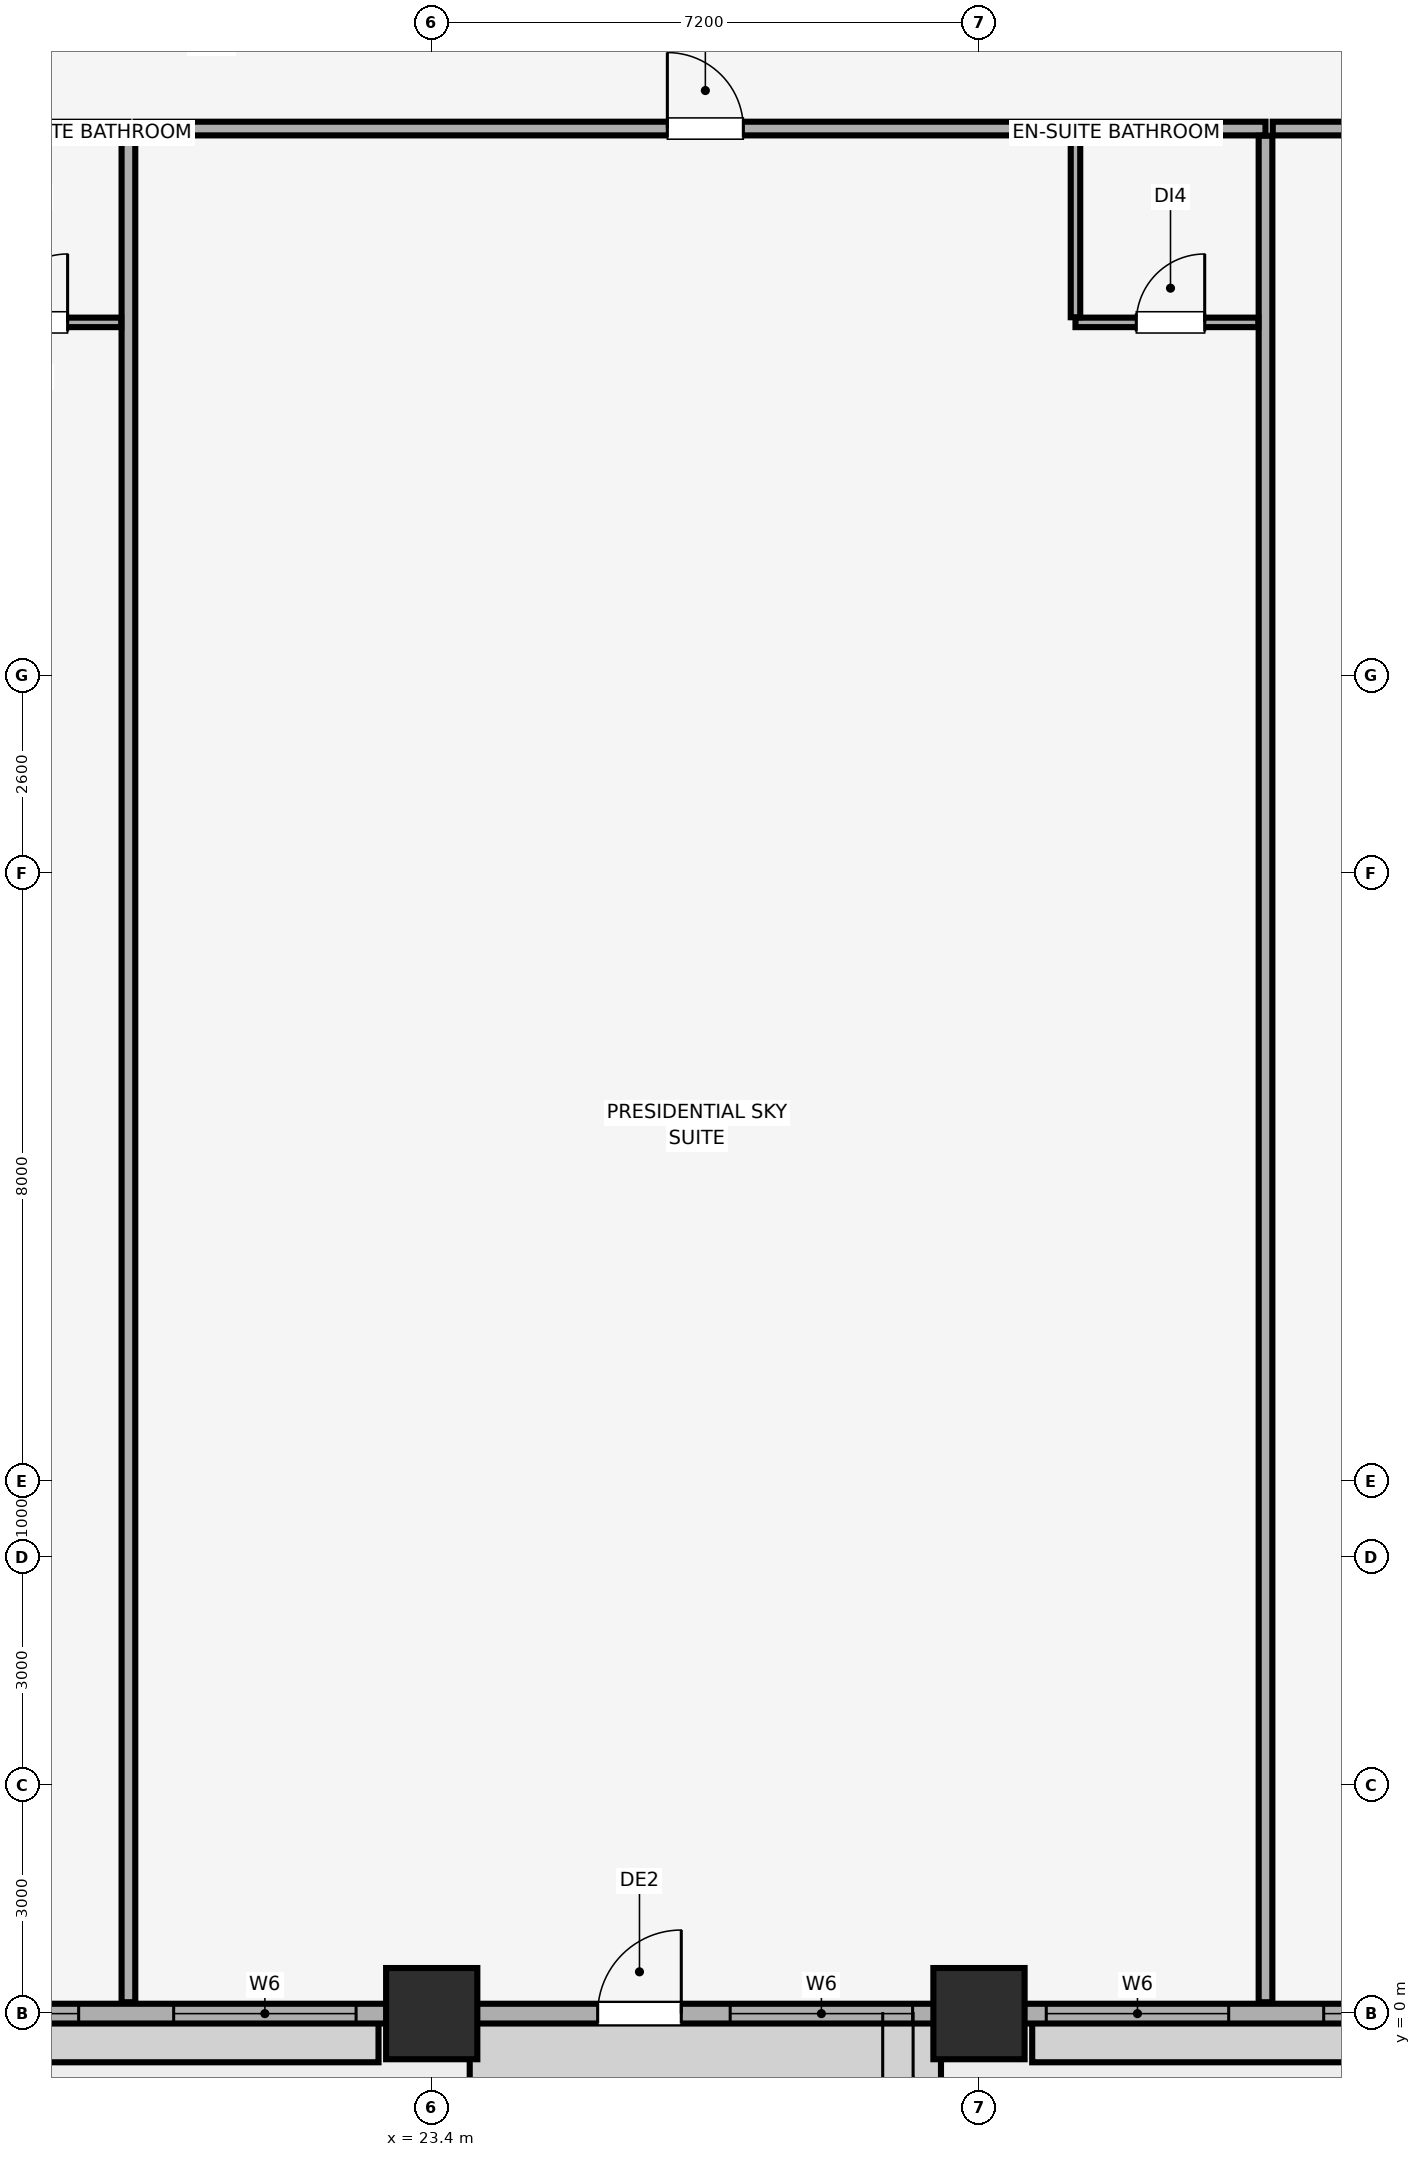
"""IFC4 building model, lengths in metres.
Left out: names, types, materials, properties, quantities, classifications, styles, units other than length and angle.
Written with IfcOpenShell. Run it as: python <this file> out.ifc"""

import sys

from ifc_helpers import new_model, si_unit, direction, frame, frame_2d, origin, origin_2d, place, context, subcontext, project, spatial, rectangle, extrude, element, fill, save


model = new_model("IFC4")
c1 = context("Model", 3, precision=1e-05, world=origin(), true_north=direction((0.0, 1.0)))
c2 = subcontext(c1, "Body", "Model", "MODEL_VIEW")
j1 = project(units=[si_unit("LENGTHUNIT", "METRE"), si_unit("PLANEANGLEUNIT", "RADIAN")], contexts=[c1])
p1 = place(None, origin())
s1 = spatial("IfcSite", under=j1, at=p1, CompositionType="ELEMENT")
p2 = place(p1, origin())
s2 = spatial("IfcBuilding", under=s1, at=p2, CompositionType="ELEMENT")
p3 = place(p2, frame((0.0, 0.0, 126.8)))
s3 = spatial("IfcBuildingStorey", under=s2, at=p3, CompositionType="ELEMENT", Elevation=126.8)
for number, where, z_axis, x_axis in (
    (1, (23.4, 0.0, 0.0), (0.0, 0.0, 1.0), (1.0, 0.0, 0.0)),
    (2, (30.6, 0.0, 0.0), (0.0, 0.0, 1.0), (1.0, 0.0, 0.0)),
):
    element("IfcColumn", number, at=place(p3, frame(where, z_axis=z_axis, x_axis=x_axis)), inside=s3, PredefinedType="COLUMN", context=c2, shape_type="SweptSolid", body=[
        extrude(rectangle(XDim=1.2, YDim=1.2, at=origin_2d()), origin(), (0.0, 0.0, 1.0), 3.51),
    ])
p4 = place(p3, frame((4.2, 0.0, 0.0), z_axis=(0.0, 0.0, 1.0), x_axis=(1.0, 0.0, 0.0)))
e3 = element("IfcWall", 3, at=p4, inside=s3, PredefinedType="SOLIDWALL", context=c2, shape_type="SweptSolid", body=[
    extrude(rectangle(XDim=75.6, YDim=0.26, at=frame_2d((37.8, 0.0))), origin(), (0.0, 0.0, 1.0), 2.56),
])
p5 = place(p4, frame((21.383, 0.0, 0.0)))
e4 = element("IfcOpeningElement", 4, at=p5, cuts=e3, PredefinedType="OPENING", context=c2, shape_type="SweptSolid", body=[
    extrude(rectangle(XDim=1.1, YDim=2.15, at=frame_2d((0.55, 1.075))), frame((0.0, 0.14, 0.0), z_axis=(0.0, -1.0, 0.0), x_axis=(1.0, 0.0, 0.0)), (0.0, 0.0, 1.0), 0.28),
])
p6 = place(p4, frame((36.432, 0.0, 0.0)))
e5 = element("IfcOpeningElement", 5, at=p6, cuts=e3, PredefinedType="OPENING", context=c2, shape_type="SweptSolid", body=[
    extrude(rectangle(XDim=1.1, YDim=2.15, at=frame_2d((0.55, 1.075))), frame((0.0, 0.14, 0.0), z_axis=(0.0, -1.0, 0.0), x_axis=(1.0, 0.0, 0.0)), (0.0, 0.0, 1.0), 0.28),
])
p7 = place(p4, frame((58.094, 0.0, 0.0)))
e6 = element("IfcOpeningElement", 6, at=p7, cuts=e3, PredefinedType="OPENING", context=c2, shape_type="SweptSolid", body=[
    extrude(rectangle(XDim=1.1, YDim=2.15, at=frame_2d((0.55, 1.075))), frame((0.0, 0.14, 0.0), z_axis=(0.0, -1.0, 0.0), x_axis=(1.0, 0.0, 0.0)), (0.0, 0.0, 1.0), 0.28),
])
p8 = place(p4, frame((1.035, 0.0, 0.85)))
e7 = element("IfcOpeningElement", 7, at=p8, cuts=e3, PredefinedType="OPENING", context=c2, shape_type="SweptSolid", body=[
    extrude(rectangle(XDim=2.4, YDim=1.5, at=frame_2d((1.2, 0.75))), frame((0.0, 0.14, 0.0), z_axis=(0.0, -1.0, 0.0), x_axis=(1.0, 0.0, 0.0)), (0.0, 0.0, 1.0), 0.28),
])
p9 = place(p4, frame((7.2, 0.0, 0.85)))
e8 = element("IfcOpeningElement", 8, at=p9, cuts=e3, PredefinedType="OPENING", context=c2, shape_type="SweptSolid", body=[
    extrude(rectangle(XDim=2.4, YDim=1.5, at=frame_2d((1.2, 0.75))), frame((0.0, 0.14, 0.0), z_axis=(0.0, -1.0, 0.0), x_axis=(1.0, 0.0, 0.0)), (0.0, 0.0, 1.0), 0.28),
])
p10 = place(p4, frame((13.055, 0.0, 0.85)))
e9 = element("IfcOpeningElement", 9, at=p10, cuts=e3, PredefinedType="OPENING", context=c2, shape_type="SweptSolid", body=[
    extrude(rectangle(XDim=1.5, YDim=1.4, at=frame_2d((0.75, 0.7))), frame((0.0, 0.14, 0.0), z_axis=(0.0, -1.0, 0.0), x_axis=(1.0, 0.0, 0.0)), (0.0, 0.0, 1.0), 0.28),
])
p11 = place(p4, frame((15.805, 0.0, 0.85)))
e10 = element("IfcOpeningElement", 10, at=p11, cuts=e3, PredefinedType="OPENING", context=c2, shape_type="SweptSolid", body=[
    extrude(rectangle(XDim=2.4, YDim=1.5, at=frame_2d((1.2, 0.75))), frame((0.0, 0.14, 0.0), z_axis=(0.0, -1.0, 0.0), x_axis=(1.0, 0.0, 0.0)), (0.0, 0.0, 1.0), 0.28),
])
p12 = place(p4, frame((23.127, 0.0, 0.85)))
e11 = element("IfcOpeningElement", 11, at=p12, cuts=e3, PredefinedType="OPENING", context=c2, shape_type="SweptSolid", body=[
    extrude(rectangle(XDim=2.4, YDim=1.5, at=frame_2d((1.2, 0.75))), frame((0.0, 0.14, 0.0), z_axis=(0.0, -1.0, 0.0), x_axis=(1.0, 0.0, 0.0)), (0.0, 0.0, 1.0), 0.28),
])
p13 = place(p4, frame((27.285, 0.0, 0.85)))
e12 = element("IfcOpeningElement", 12, at=p13, cuts=e3, PredefinedType="OPENING", context=c2, shape_type="SweptSolid", body=[
    extrude(rectangle(XDim=2.4, YDim=1.5, at=frame_2d((1.2, 0.75))), frame((0.0, 0.14, 0.0), z_axis=(0.0, -1.0, 0.0), x_axis=(1.0, 0.0, 0.0)), (0.0, 0.0, 1.0), 0.28),
])
p14 = place(p4, frame((30.935, 0.0, 0.85)))
e13 = element("IfcOpeningElement", 13, at=p14, cuts=e3, PredefinedType="OPENING", context=c2, shape_type="SweptSolid", body=[
    extrude(rectangle(XDim=1.5, YDim=1.4, at=frame_2d((0.75, 0.7))), frame((0.0, 0.14, 0.0), z_axis=(0.0, -1.0, 0.0), x_axis=(1.0, 0.0, 0.0)), (0.0, 0.0, 1.0), 0.28),
])
p15 = place(p4, frame((38.451, 0.0, 0.85)))
e14 = element("IfcOpeningElement", 14, at=p15, cuts=e3, PredefinedType="OPENING", context=c2, shape_type="SweptSolid", body=[
    extrude(rectangle(XDim=2.4, YDim=1.5, at=frame_2d((1.2, 0.75))), frame((0.0, 0.14, 0.0), z_axis=(0.0, -1.0, 0.0), x_axis=(1.0, 0.0, 0.0)), (0.0, 0.0, 1.0), 0.28),
])
p16 = place(p4, frame((43.115, 0.0, 0.85)))
e15 = element("IfcOpeningElement", 15, at=p16, cuts=e3, PredefinedType="OPENING", context=c2, shape_type="SweptSolid", body=[
    extrude(rectangle(XDim=1.5, YDim=1.4, at=frame_2d((0.75, 0.7))), frame((0.0, 0.14, 0.0), z_axis=(0.0, -1.0, 0.0), x_axis=(1.0, 0.0, 0.0)), (0.0, 0.0, 1.0), 0.28),
])
p17 = place(p4, frame((45.865, 0.0, 0.85)))
e16 = element("IfcOpeningElement", 16, at=p17, cuts=e3, PredefinedType="OPENING", context=c2, shape_type="SweptSolid", body=[
    extrude(rectangle(XDim=2.4, YDim=1.5, at=frame_2d((1.2, 0.75))), frame((0.0, 0.14, 0.0), z_axis=(0.0, -1.0, 0.0), x_axis=(1.0, 0.0, 0.0)), (0.0, 0.0, 1.0), 0.28),
])
p18 = place(p4, frame((51.6, 0.0, 0.85)))
e17 = element("IfcOpeningElement", 17, at=p18, cuts=e3, PredefinedType="OPENING", context=c2, shape_type="SweptSolid", body=[
    extrude(rectangle(XDim=2.4, YDim=1.5, at=frame_2d((1.2, 0.75))), frame((0.0, 0.14, 0.0), z_axis=(0.0, -1.0, 0.0), x_axis=(1.0, 0.0, 0.0)), (0.0, 0.0, 1.0), 0.28),
])
p19 = place(p4, frame((61.095, 0.0, 0.85)))
e18 = element("IfcOpeningElement", 18, at=p19, cuts=e3, PredefinedType="OPENING", context=c2, shape_type="SweptSolid", body=[
    extrude(rectangle(XDim=1.5, YDim=1.4, at=frame_2d((0.75, 0.7))), frame((0.0, 0.14, 0.0), z_axis=(0.0, -1.0, 0.0), x_axis=(1.0, 0.0, 0.0)), (0.0, 0.0, 1.0), 0.28),
])
p20 = place(p4, frame((66.0, 0.0, 0.85)))
e19 = element("IfcOpeningElement", 19, at=p20, cuts=e3, PredefinedType="OPENING", context=c2, shape_type="SweptSolid", body=[
    extrude(rectangle(XDim=2.4, YDim=1.5, at=frame_2d((1.2, 0.75))), frame((0.0, 0.14, 0.0), z_axis=(0.0, -1.0, 0.0), x_axis=(1.0, 0.0, 0.0)), (0.0, 0.0, 1.0), 0.28),
])
p21 = place(p4, frame((72.165, 0.0, 0.85)))
e20 = element("IfcOpeningElement", 20, at=p21, cuts=e3, PredefinedType="OPENING", context=c2, shape_type="SweptSolid", body=[
    extrude(rectangle(XDim=2.4, YDim=1.5, at=frame_2d((1.2, 0.75))), frame((0.0, 0.14, 0.0), z_axis=(0.0, -1.0, 0.0), x_axis=(1.0, 0.0, 0.0)), (0.0, 0.0, 1.0), 0.28),
])
p22 = place(p3, frame((0.15, 24.8, 0.0), z_axis=(0.0, 0.0, 1.0), x_axis=(1.0, 0.0, 0.0)))
e21 = element("IfcWall", 21, at=p22, inside=s3, PredefinedType="PARTITIONING", context=c2, shape_type="SweptSolid", body=[
    extrude(rectangle(XDim=19.26, YDim=0.18, at=frame_2d((9.63, 0.0))), origin(), (0.0, 0.0, 1.0), 3.51),
])
p23 = place(p22, frame((11.95, 0.0, 0.0)))
e22 = element("IfcOpeningElement", 22, at=p23, cuts=e21, PredefinedType="OPENING", context=c2, shape_type="SweptSolid", body=[
    extrude(rectangle(XDim=1.0, YDim=2.15, at=frame_2d((0.5, 1.075))), frame((0.0, 0.1, 0.0), z_axis=(0.0, -1.0, 0.0), x_axis=(1.0, 0.0, 0.0)), (0.0, 0.0, 1.0), 0.2),
])
p24 = place(p3, frame((19.41, 0.15, 0.0), z_axis=(0.0, 0.0, 1.0), x_axis=(0.0, 1.0, 0.0)))
e23 = element("IfcWall", 23, at=p24, inside=s3, PredefinedType="PARTITIONING", context=c2, shape_type="SweptSolid", body=[
    extrude(rectangle(XDim=24.555, YDim=0.18, at=frame_2d((12.278, 0.0))), origin(), (0.0, 0.0, 1.0), 3.51),
])
p25 = place(p3, frame((16.91, 22.25, 0.0), z_axis=(0.0, 0.0, 1.0), x_axis=(1.0, 0.0, 0.0)))
e24 = element("IfcWall", 24, at=p25, inside=s3, PredefinedType="PARTITIONING", context=c2, shape_type="SweptSolid", body=[
    extrude(rectangle(XDim=2.405, YDim=0.125, at=frame_2d((1.202, 0.0))), origin(), (0.0, 0.0, 1.0), 3.51),
])
p26 = place(p25, frame((0.8, 0.0, 0.0)))
e25 = element("IfcOpeningElement", 25, at=p26, cuts=e24, PredefinedType="OPENING", context=c2, shape_type="SweptSolid", body=[
    extrude(rectangle(XDim=0.9, YDim=2.1, at=frame_2d((0.45, 1.05))), frame((0.0, 0.073, 0.0), z_axis=(0.0, -1.0, 0.0), x_axis=(1.0, 0.0, 0.0)), (0.0, 0.0, 1.0), 0.145),
])
p27 = place(p3, frame((19.505, 24.8, 0.0), z_axis=(0.0, 0.0, 1.0), x_axis=(1.0, 0.0, 0.0)))
e26 = element("IfcWall", 26, at=p27, inside=s3, PredefinedType="PARTITIONING", context=c2, shape_type="SweptSolid", body=[
    extrude(rectangle(XDim=14.865, YDim=0.18, at=frame_2d((7.432, 0.0))), origin(), (0.0, 0.0, 1.0), 3.51),
])
p28 = place(p27, frame((6.995, 0.0, 0.0)))
e27 = element("IfcOpeningElement", 27, at=p28, cuts=e26, PredefinedType="OPENING", context=c2, shape_type="SweptSolid", body=[
    extrude(rectangle(XDim=1.0, YDim=2.15, at=frame_2d((0.5, 1.075))), frame((0.0, 0.1, 0.0), z_axis=(0.0, -1.0, 0.0), x_axis=(1.0, 0.0, 0.0)), (0.0, 0.0, 1.0), 0.2),
])
p29 = place(p3, frame((34.369, 0.15, 0.0), z_axis=(0.0, 0.0, 1.0), x_axis=(0.0, 1.0, 0.0)))
e28 = element("IfcWall", 28, at=p29, inside=s3, PredefinedType="PARTITIONING", context=c2, shape_type="SweptSolid", body=[
    extrude(rectangle(XDim=24.555, YDim=0.18, at=frame_2d((12.278, 0.0))), origin(), (0.0, 0.0, 1.0), 2.91),
])
p30 = place(p3, frame((31.869, 22.25, 0.0), z_axis=(0.0, 0.0, 1.0), x_axis=(1.0, 0.0, 0.0)))
e29 = element("IfcWall", 29, at=p30, inside=s3, PredefinedType="PARTITIONING", context=c2, shape_type="SweptSolid", body=[
    extrude(rectangle(XDim=2.405, YDim=0.125, at=frame_2d((1.203, 0.0))), origin(), (0.0, 0.0, 1.0), 3.51),
])
p31 = place(p30, frame((0.8, 0.0, 0.0)))
e30 = element("IfcOpeningElement", 30, at=p31, cuts=e29, PredefinedType="OPENING", context=c2, shape_type="SweptSolid", body=[
    extrude(rectangle(XDim=0.9, YDim=2.1, at=frame_2d((0.45, 1.05))), frame((0.0, 0.073, 0.0), z_axis=(0.0, -1.0, 0.0), x_axis=(1.0, 0.0, 0.0)), (0.0, 0.0, 1.0), 0.145),
])
p32 = place(p3, frame((31.869, 22.317, 0.0), z_axis=(0.0, 0.0, 1.0), x_axis=(0.0, 1.0, 0.0)))
e31 = element("IfcWall", 31, at=p32, inside=s3, PredefinedType="PARTITIONING", context=c2, shape_type="SweptSolid", body=[
    extrude(rectangle(XDim=2.388, YDim=0.125, at=frame_2d((1.194, 0.0))), origin(), (0.0, 0.0, 1.0), 3.51),
])
p33 = place(p3, frame((34.465, 24.8, 0.0), z_axis=(0.0, 0.0, 1.0), x_axis=(1.0, 0.0, 0.0)))
e32 = element("IfcWall", 32, at=p33, inside=s3, PredefinedType="PARTITIONING", context=c2, shape_type="SweptSolid", body=[
    extrude(rectangle(XDim=15.065, YDim=0.18, at=frame_2d((7.533, 0.0))), origin(), (0.0, 0.0, 1.0), 3.51),
])
p34 = place(p33, frame((7.035, 0.0, 0.0)))
e33 = element("IfcOpeningElement", 33, at=p34, cuts=e32, PredefinedType="OPENING", context=c2, shape_type="SweptSolid", body=[
    extrude(rectangle(XDim=1.0, YDim=2.15, at=frame_2d((0.5, 1.075))), frame((0.0, 0.1, 0.0), z_axis=(0.0, -1.0, 0.0), x_axis=(1.0, 0.0, 0.0)), (0.0, 0.0, 1.0), 0.2),
])
p35 = place(p5, origin())
e34 = element("IfcDoor", 34, at=p35, inside=s3, OperationType="SINGLE_SWING_RIGHT", PredefinedType="DOOR", context=c2, shape_type="SweptSolid", body=[
    extrude(rectangle(XDim=1.1, YDim=2.15, at=frame_2d((0.55, 1.075))), frame((0.0, 0.025, 0.0), z_axis=(0.0, -1.0, 0.0), x_axis=(1.0, 0.0, 0.0)), (0.0, 0.0, 1.0), 0.05),
])
fill(e4, e34)
p36 = place(p10, origin())
e35 = element("IfcWindow", 35, at=p36, inside=s3, PartitioningType="SINGLE_PANEL", PredefinedType="WINDOW", context=c2, shape_type="SweptSolid", body=[
    extrude(rectangle(XDim=1.5, YDim=1.4, at=frame_2d((0.75, 0.7))), frame((0.0, 0.03, 0.0), z_axis=(0.0, -1.0, 0.0), x_axis=(1.0, 0.0, 0.0)), (0.0, 0.0, 1.0), 0.06),
])
fill(e9, e35)
p37 = place(p11, origin())
e36 = element("IfcWindow", 36, at=p37, inside=s3, PartitioningType="SINGLE_PANEL", PredefinedType="WINDOW", context=c2, shape_type="SweptSolid", body=[
    extrude(rectangle(XDim=2.4, YDim=1.5, at=frame_2d((1.2, 0.75))), frame((0.0, 0.03, 0.0), z_axis=(0.0, -1.0, 0.0), x_axis=(1.0, 0.0, 0.0)), (0.0, 0.0, 1.0), 0.06),
])
fill(e10, e36)
p38 = place(p12, origin())
e37 = element("IfcWindow", 37, at=p38, inside=s3, PartitioningType="SINGLE_PANEL", PredefinedType="WINDOW", context=c2, shape_type="SweptSolid", body=[
    extrude(rectangle(XDim=2.4, YDim=1.5, at=frame_2d((1.2, 0.75))), frame((0.0, 0.03, 0.0), z_axis=(0.0, -1.0, 0.0), x_axis=(1.0, 0.0, 0.0)), (0.0, 0.0, 1.0), 0.06),
])
fill(e11, e37)
p39 = place(p13, origin())
e38 = element("IfcWindow", 38, at=p39, inside=s3, PartitioningType="SINGLE_PANEL", PredefinedType="WINDOW", context=c2, shape_type="SweptSolid", body=[
    extrude(rectangle(XDim=2.4, YDim=1.5, at=frame_2d((1.2, 0.75))), frame((0.0, 0.03, 0.0), z_axis=(0.0, -1.0, 0.0), x_axis=(1.0, 0.0, 0.0)), (0.0, 0.0, 1.0), 0.06),
])
fill(e12, e38)
p40 = place(p14, origin())
e39 = element("IfcWindow", 39, at=p40, inside=s3, PartitioningType="SINGLE_PANEL", PredefinedType="WINDOW", context=c2, shape_type="SweptSolid", body=[
    extrude(rectangle(XDim=1.5, YDim=1.4, at=frame_2d((0.75, 0.7))), frame((0.0, 0.03, 0.0), z_axis=(0.0, -1.0, 0.0), x_axis=(1.0, 0.0, 0.0)), (0.0, 0.0, 1.0), 0.06),
])
fill(e13, e39)
p41 = place(p26, origin())
e40 = element("IfcDoor", 40, at=p41, inside=s3, OperationType="SINGLE_SWING_RIGHT", PredefinedType="DOOR", context=c2, shape_type="SweptSolid", body=[
    extrude(rectangle(XDim=0.9, YDim=2.1, at=frame_2d((0.45, 1.05))), frame((0.0, 0.025, 0.0), z_axis=(0.0, -1.0, 0.0), x_axis=(1.0, 0.0, 0.0)), (0.0, 0.0, 1.0), 0.05),
])
fill(e25, e40)
p42 = place(p28, origin())
e41 = element("IfcDoor", 41, at=p42, inside=s3, OperationType="SINGLE_SWING_LEFT", PredefinedType="DOOR", context=c2, shape_type="SweptSolid", body=[
    extrude(rectangle(XDim=1.0, YDim=2.15, at=frame_2d((0.5, 1.075))), frame((0.0, 0.025, 0.0), z_axis=(0.0, -1.0, 0.0), x_axis=(1.0, 0.0, 0.0)), (0.0, 0.0, 1.0), 0.05),
])
fill(e27, e41)
p43 = place(p31, origin())
e42 = element("IfcDoor", 42, at=p43, inside=s3, OperationType="SINGLE_SWING_RIGHT", PredefinedType="DOOR", context=c2, shape_type="SweptSolid", body=[
    extrude(rectangle(XDim=0.9, YDim=2.1, at=frame_2d((0.45, 1.05))), frame((0.0, 0.025, 0.0), z_axis=(0.0, -1.0, 0.0), x_axis=(1.0, 0.0, 0.0)), (0.0, 0.0, 1.0), 0.05),
])
fill(e30, e42)
save(model, sys.argv[1])
